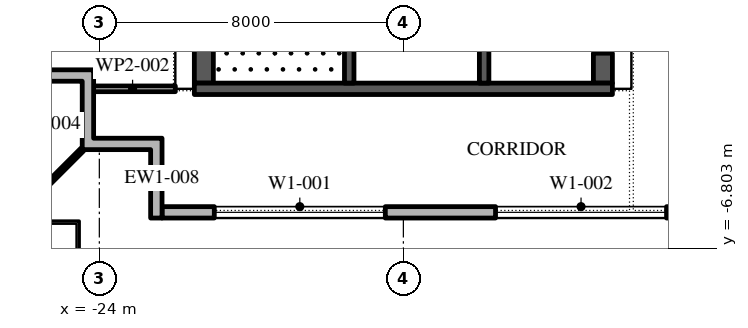
"""IFC4 building model, lengths in metres.
Left out: names, types, materials, properties, quantities, classifications, styles, units other than length and angle.
Written with IfcOpenShell. Run it as: python <this file> out.ifc"""

import sys

from ifc_helpers import new_model, si_unit, direction, frame, frame_2d, origin, place, context, subcontext, project, spatial, polyline, rectangle, outline, extrude, element, fill, save


model = new_model("IFC4")
c1 = context("Model", 3, precision=1e-05, world=origin(), true_north=direction((0.0, 1.0)))
c2 = subcontext(c1, "Body", "Model", "MODEL_VIEW")
j1 = project(units=[si_unit("LENGTHUNIT", "METRE"), si_unit("PLANEANGLEUNIT", "RADIAN")], contexts=[c1])
p1 = place(None, origin())
s1 = spatial("IfcSite", under=j1, at=p1, CompositionType="ELEMENT")
p2 = place(p1, origin())
s2 = spatial("IfcBuilding", under=s1, at=p2, CompositionType="ELEMENT")
p3 = place(p2, frame((0.0, 0.0, 313.2)))
s3 = spatial("IfcBuildingStorey", under=s2, at=p3, CompositionType="ELEMENT", Elevation=313.2)
p4 = place(p3, frame((-22.35, -5.85, 0.0), z_axis=(0.0, 0.0, 1.0), x_axis=(1.0, 0.0, 0.0)))
e1 = element("IfcWall", 1, at=p4, inside=s3, PredefinedType="STANDARD", context=c2, shape_type="SweptSolid", body=[
    extrude(rectangle(XDim=45.0, YDim=0.3, at=frame_2d((22.5, 0.0))), origin(), (0.0, 0.0, 1.0), 4.0),
])
p5 = place(p4, frame((1.375, 0.0, 0.45)))
e2 = element("IfcOpeningElement", 2, at=p5, cuts=e1, PredefinedType="OPENING", context=c2, shape_type="SweptSolid", body=[
    extrude(rectangle(XDim=4.5, YDim=3.05, at=frame_2d((2.25, 1.525))), frame((0.0, 0.16, 0.0), z_axis=(0.0, -1.0, 0.0), x_axis=(1.0, 0.0, 0.0)), (0.0, 0.0, 1.0), 0.32),
])
p6 = place(p4, frame((8.775, 0.0, 0.45)))
e3 = element("IfcOpeningElement", 3, at=p6, cuts=e1, PredefinedType="OPENING", context=c2, shape_type="SweptSolid", body=[
    extrude(rectangle(XDim=4.5, YDim=3.05, at=frame_2d((2.25, 1.525))), frame((0.0, 0.16, 0.0), z_axis=(0.0, -1.0, 0.0), x_axis=(1.0, 0.0, 0.0)), (0.0, 0.0, 1.0), 0.32),
])
p7 = place(p4, frame((17.375, 0.0, 0.0)))
e4 = element("IfcOpeningElement", 4, at=p7, cuts=e1, PredefinedType="OPENING", context=c2, shape_type="SweptSolid", body=[
    extrude(rectangle(XDim=2.4, YDim=3.5, at=frame_2d((1.2, 1.75))), frame((0.0, 0.16, 0.0), z_axis=(0.0, -1.0, 0.0), x_axis=(1.0, 0.0, 0.0)), (0.0, 0.0, 1.0), 0.32),
])
p8 = place(p4, frame((23.875, 0.0, 0.45)))
e5 = element("IfcOpeningElement", 5, at=p8, cuts=e1, PredefinedType="OPENING", context=c2, shape_type="SweptSolid", body=[
    extrude(rectangle(XDim=4.5, YDim=3.05, at=frame_2d((2.25, 1.525))), frame((0.0, 0.16, 0.0), z_axis=(0.0, -1.0, 0.0), x_axis=(1.0, 0.0, 0.0)), (0.0, 0.0, 1.0), 0.32),
])
p9 = place(p4, frame((31.425, 0.0, 0.45)))
e6 = element("IfcOpeningElement", 6, at=p9, cuts=e1, PredefinedType="OPENING", context=c2, shape_type="SweptSolid", body=[
    extrude(rectangle(XDim=4.5, YDim=3.05, at=frame_2d((2.25, 1.525))), frame((0.0, 0.16, 0.0), z_axis=(0.0, -1.0, 0.0), x_axis=(1.0, 0.0, 0.0)), (0.0, 0.0, 1.0), 0.32),
])
p10 = place(p4, frame((38.975, 0.0, 0.45)))
e7 = element("IfcOpeningElement", 7, at=p10, cuts=e1, PredefinedType="OPENING", context=c2, shape_type="SweptSolid", body=[
    extrude(rectangle(XDim=4.5, YDim=3.05, at=frame_2d((2.25, 1.525))), frame((0.0, 0.16, 0.0), z_axis=(0.0, -1.0, 0.0), x_axis=(1.0, 0.0, 0.0)), (0.0, 0.0, 1.0), 0.32),
])
p11 = place(p3, origin())
e8 = element("IfcWall", 8, at=p11, inside=s3, PredefinedType="STANDARD", context=c2, shape_type="SweptSolid", body=[
    extrude(outline(polyline([(-22.65, -4.2), (-24.45, -4.2), (-24.45, -2.4), (-25.95, -2.4), (-25.95, -2.1), (-24.15, -2.1), (-24.15, -3.9), (-22.35, -3.9), (-22.35, -6.0), (-22.65, -6.0), (-22.65, -4.2)])), origin(), (0.0, 0.0, 1.0), 4.0),
])
p12 = place(p3, frame((-24.45, -4.2, -0.05), z_axis=(0.0, 0.0, 1.0), x_axis=(-0.707106781187, -0.707106781187, 0.0)))
e9 = element("IfcWall", 9, at=p12, inside=s3, PredefinedType="STANDARD", context=c2, shape_type="SweptSolid", body=[
    extrude(rectangle(XDim=2.667, YDim=0.1, at=frame_2d((1.333, 0.0))), origin(), (0.0, 0.0, 1.0), 4.05),
])
p13 = place(p3, frame((-21.25, -2.45, 0.0), z_axis=(0.0, 0.0, 1.0), x_axis=(0.0, 1.0, 0.0)))
e10 = element("IfcWall", 10, at=p13, inside=s3, PredefinedType="SHEAR", context=c2, shape_type="SweptSolid", body=[
    extrude(rectangle(XDim=27.9, YDim=0.5, at=frame_2d((13.95, 0.0))), origin(), (0.0, 0.0, 1.0), 4.0),
])
p14 = place(p13, frame((5.05, 0.0, 0.0)))
e11 = element("IfcOpeningElement", 11, at=p14, cuts=e10, PredefinedType="OPENING", context=c2, shape_type="SweptSolid", body=[
    extrude(rectangle(XDim=1.2, YDim=2.1, at=frame_2d((0.6, 1.05))), frame((0.0, 0.26, 0.0), z_axis=(0.0, -1.0, 0.0), x_axis=(1.0, 0.0, 0.0)), (0.0, 0.0, 1.0), 0.52),
])
p15 = place(p13, frame((21.65, 0.0, 0.0)))
e12 = element("IfcOpeningElement", 12, at=p15, cuts=e10, PredefinedType="OPENING", context=c2, shape_type="SweptSolid", body=[
    extrude(rectangle(XDim=1.2, YDim=2.1, at=frame_2d((0.6, 1.05))), frame((0.0, 0.26, 0.0), z_axis=(0.0, -1.0, 0.0), x_axis=(1.0, 0.0, 0.0)), (0.0, 0.0, 1.0), 0.52),
])
p16 = place(p3, frame((-10.75, -2.45, 0.0), z_axis=(0.0, 0.0, 1.0), x_axis=(0.0, 1.0, 0.0)))
e13 = element("IfcWall", 13, at=p16, inside=s3, PredefinedType="SHEAR", context=c2, shape_type="SweptSolid", body=[
    extrude(rectangle(XDim=27.9, YDim=0.5, at=frame_2d((13.95, 0.0))), origin(), (0.0, 0.0, 1.0), 4.0),
])
p17 = place(p16, frame((23.65, 0.0, 0.0)))
e14 = element("IfcOpeningElement", 14, at=p17, cuts=e13, PredefinedType="OPENING", context=c2, shape_type="SweptSolid", body=[
    extrude(rectangle(XDim=2.4, YDim=2.1, at=frame_2d((1.2, 1.05))), frame((0.0, 0.26, 0.0), z_axis=(0.0, -1.0, 0.0), x_axis=(1.0, 0.0, 0.0)), (0.0, 0.0, 1.0), 0.52),
])
p18 = place(p16, frame((0.788, 0.0, 0.0)))
e15 = element("IfcOpeningElement", 15, at=p18, cuts=e13, PredefinedType="OPENING", context=c2, shape_type="SweptSolid", body=[
    extrude(rectangle(XDim=0.9, YDim=2.1, at=frame_2d((0.45, 1.05))), frame((0.0, 0.26, 0.0), z_axis=(0.0, -1.0, 0.0), x_axis=(1.0, 0.0, 0.0)), (0.0, 0.0, 1.0), 0.52),
])
p19 = place(p16, frame((3.962, 0.0, 0.0)))
e16 = element("IfcOpeningElement", 16, at=p19, cuts=e13, PredefinedType="OPENING", context=c2, shape_type="SweptSolid", body=[
    extrude(rectangle(XDim=1.0, YDim=2.1, at=frame_2d((0.5, 1.05))), frame((0.0, 0.26, 0.0), z_axis=(0.0, -1.0, 0.0), x_axis=(1.0, 0.0, 0.0)), (0.0, 0.0, 1.0), 0.52),
])
p20 = place(p3, frame((-21.5, -2.6, 0.0), z_axis=(0.0, 0.0, 1.0), x_axis=(1.0, 0.0, 0.0)))
e17 = element("IfcWall", 17, at=p20, inside=s3, PredefinedType="SHEAR", context=c2, shape_type="SweptSolid", body=[
    extrude(rectangle(XDim=11.0, YDim=0.3, at=frame_2d((5.5, 0.0))), origin(), (0.0, 0.0, 1.0), 4.0),
])
p21 = place(p3, frame((-17.425, -2.45, 0.0), z_axis=(0.0, 0.0, 1.0), x_axis=(0.0, 1.0, 0.0)))
e18 = element("IfcWall", 18, at=p21, inside=s3, PredefinedType="SHEAR", context=c2, shape_type="SweptSolid", body=[
    extrude(rectangle(XDim=6.3, YDim=0.25, at=frame_2d((3.15, 0.0))), origin(), (0.0, 0.0, 1.0), 4.0),
])
p22 = place(p21, frame((5.05, 0.0, 0.0)))
e19 = element("IfcOpeningElement", 19, at=p22, cuts=e18, PredefinedType="OPENING", context=c2, shape_type="SweptSolid", body=[
    extrude(rectangle(XDim=1.2, YDim=2.1, at=frame_2d((0.6, 1.05))), frame((0.0, 0.135, 0.0), z_axis=(0.0, -1.0, 0.0), x_axis=(1.0, 0.0, 0.0)), (0.0, 0.0, 1.0), 0.27),
])
p23 = place(p3, frame((-13.875, -2.45, 0.0), z_axis=(0.0, 0.0, 1.0), x_axis=(0.0, 1.0, 0.0)))
e20 = element("IfcWall", 20, at=p23, inside=s3, PredefinedType="SHEAR", context=c2, shape_type="SweptSolid", body=[
    extrude(rectangle(XDim=21.3, YDim=0.25, at=frame_2d((10.65, 0.0))), origin(), (0.0, 0.0, 1.0), 4.0),
])
p24 = place(p23, frame((11.357, 0.0, 0.0)))
e21 = element("IfcOpeningElement", 21, at=p24, cuts=e20, PredefinedType="OPENING", context=c2, shape_type="SweptSolid", body=[
    extrude(rectangle(XDim=0.9, YDim=2.1, at=frame_2d((0.45, 1.05))), frame((0.0, 0.135, 0.0), z_axis=(0.0, -1.0, 0.0), x_axis=(1.0, 0.0, 0.0)), (0.0, 0.0, 1.0), 0.27),
])
p25 = place(p23, frame((6.971, 0.0, 0.0)))
e22 = element("IfcOpeningElement", 22, at=p25, cuts=e20, PredefinedType="OPENING", context=c2, shape_type="SweptSolid", body=[
    extrude(rectangle(XDim=1.1, YDim=2.1, at=frame_2d((0.55, 1.05))), frame((0.0, 0.135, 0.0), z_axis=(0.0, -1.0, 0.0), x_axis=(1.0, 0.0, 0.0)), (0.0, 0.0, 1.0), 0.27),
])
p26 = place(p23, frame((15.543, 0.0, 0.0)))
e23 = element("IfcOpeningElement", 23, at=p26, cuts=e20, PredefinedType="OPENING", context=c2, shape_type="SweptSolid", body=[
    extrude(rectangle(XDim=1.1, YDim=2.1, at=frame_2d((0.55, 1.05))), frame((0.0, 0.135, 0.0), z_axis=(0.0, -1.0, 0.0), x_axis=(1.0, 0.0, 0.0)), (0.0, 0.0, 1.0), 0.27),
])
p27 = place(p23, frame((17.686, 0.0, 0.0)))
e24 = element("IfcOpeningElement", 24, at=p27, cuts=e20, PredefinedType="OPENING", context=c2, shape_type="SweptSolid", body=[
    extrude(rectangle(XDim=1.1, YDim=2.1, at=frame_2d((0.55, 1.05))), frame((0.0, 0.135, 0.0), z_axis=(0.0, -1.0, 0.0), x_axis=(1.0, 0.0, 0.0)), (0.0, 0.0, 1.0), 0.27),
])
p28 = place(p23, frame((19.829, 0.0, 0.0)))
e25 = element("IfcOpeningElement", 25, at=p28, cuts=e20, PredefinedType="OPENING", context=c2, shape_type="SweptSolid", body=[
    extrude(rectangle(XDim=1.1, YDim=2.1, at=frame_2d((0.55, 1.05))), frame((0.0, 0.135, 0.0), z_axis=(0.0, -1.0, 0.0), x_axis=(1.0, 0.0, 0.0)), (0.0, 0.0, 1.0), 0.27),
])
p29 = place(p3, frame((-24.25, -2.6, 0.0), z_axis=(0.0, 0.0, 1.0), x_axis=(1.0, 0.0, 0.0)))
e26 = element("IfcWall", 26, at=p29, inside=s3, PredefinedType="PARTITIONING", context=c2, shape_type="SweptSolid", body=[
    extrude(rectangle(XDim=2.25, YDim=0.15, at=frame_2d((1.125, 0.0))), origin(), (0.0, 0.0, 1.0), 4.0),
])
p30 = place(p5, origin())
e27 = element("IfcWindow", 27, at=p30, inside=s3, PartitioningType="DOUBLE_PANEL_VERTICAL", PredefinedType="WINDOW", context=c2, shape_type="SweptSolid", body=[
    extrude(rectangle(XDim=4.5, YDim=3.05, at=frame_2d((2.25, 1.525))), frame((0.0, 0.03, 0.0), z_axis=(0.0, -1.0, 0.0), x_axis=(1.0, 0.0, 0.0)), (0.0, 0.0, 1.0), 0.06),
])
fill(e2, e27)
p31 = place(p6, origin())
e28 = element("IfcWindow", 28, at=p31, inside=s3, PartitioningType="DOUBLE_PANEL_VERTICAL", PredefinedType="WINDOW", context=c2, shape_type="SweptSolid", body=[
    extrude(rectangle(XDim=4.5, YDim=3.05, at=frame_2d((2.25, 1.525))), frame((0.0, 0.03, 0.0), z_axis=(0.0, -1.0, 0.0), x_axis=(1.0, 0.0, 0.0)), (0.0, 0.0, 1.0), 0.06),
])
fill(e3, e28)
p32 = place(p18, frame((0.9, 0.45, 0.0), z_axis=(0.0, 0.0, 1.0), x_axis=(-1.0, 0.0, 0.0)))
e29 = element("IfcDoor", 29, at=p32, inside=s3, OperationType="SINGLE_SWING_RIGHT", PredefinedType="DOOR", context=c2, shape_type="SweptSolid", body=[
    extrude(rectangle(XDim=0.9, YDim=2.1, at=frame_2d((0.45, 1.05))), frame((0.0, 0.25, 0.0), z_axis=(0.0, -1.0, 0.0), x_axis=(1.0, 0.0, 0.0)), (0.0, 0.0, 1.0), 0.05),
])
fill(e15, e29)
save(model, sys.argv[1])
